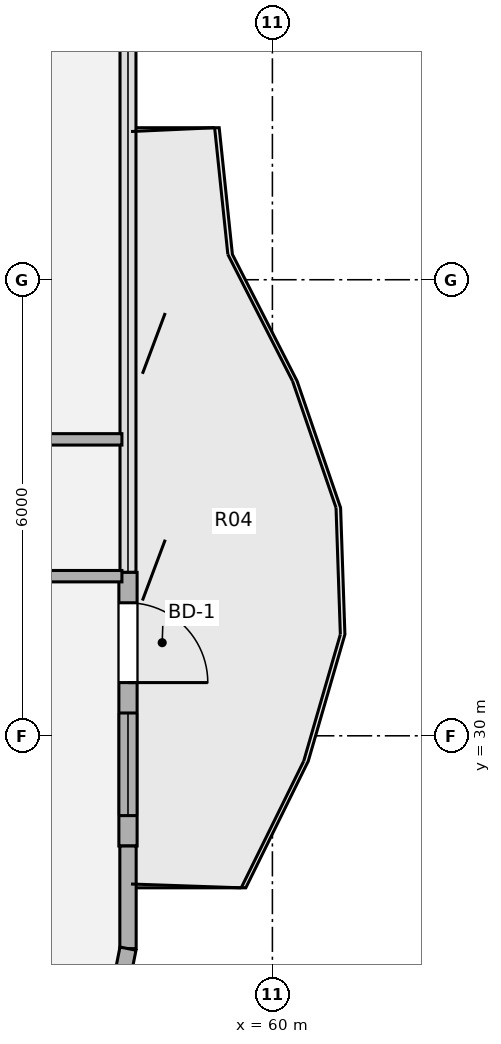
"""IFC4 building model, lengths in metres.
Left out: names, types, materials, properties, quantities, classifications, styles, units other than length and angle.
Written with IfcOpenShell. Run it as: python <this file> out.ifc"""

import sys

from ifc_helpers import new_model, si_unit, direction, frame, frame_2d, origin, origin_2d, place, context, subcontext, project, spatial, rectangle, extrude, source, transform, mapped, element, fill, save


model = new_model("IFC4")
c1 = context("Model", 3, precision=1e-05, world=origin(), true_north=direction((0.0, 1.0)))
c2 = subcontext(c1, "Body", "Model", "MODEL_VIEW")
j1 = project(units=[si_unit("LENGTHUNIT", "METRE"), si_unit("PLANEANGLEUNIT", "RADIAN")], contexts=[c1])
p1 = place(None, origin())
s1 = spatial("IfcSite", under=j1, at=p1, CompositionType="ELEMENT")
p2 = place(p1, origin())
s2 = spatial("IfcBuilding", under=s1, at=p2, CompositionType="ELEMENT")
p3 = place(p2, frame((0.0, 0.0, 112.5)))
s3 = spatial("IfcBuildingStorey", under=s2, at=p3, CompositionType="ELEMENT", Elevation=112.5)
p4 = place(p3, frame((58.1, 32.15, 0.0), z_axis=(0.0, 0.0, 1.0), x_axis=(0.0, -1.0, 0.0)))
e1 = element("IfcWall", 1, at=p4, inside=s3, PredefinedType="SOLIDWALL", context=c2, shape_type="SweptSolid", body=[
    extrude(rectangle(XDim=3.6, YDim=0.24, at=frame_2d((1.8, 0.0))), origin(), (0.0, 0.0, 1.0), 3.53),
])
p5 = place(p4, frame((0.4, 0.0, 0.0)))
e2 = element("IfcOpeningElement", 2, at=p5, cuts=e1, PredefinedType="OPENING", context=c2, shape_type="SweptSolid", body=[
    extrude(rectangle(XDim=1.05, YDim=2.15, at=origin_2d()), frame((0.525, 0.13, 1.075), z_axis=(0.0, -1.0, 0.0), x_axis=(1.0, 0.0, 0.0)), (0.0, 0.0, 1.0), 0.26),
])
p6 = place(p4, frame((1.85, 0.0, 0.85)))
e3 = element("IfcOpeningElement", 3, at=p6, cuts=e1, PredefinedType="OPENING", context=c2, shape_type="SweptSolid", body=[
    extrude(rectangle(XDim=1.35, YDim=1.35, at=origin_2d()), frame((0.675, 0.13, 0.675), z_axis=(0.0, -1.0, 0.0), x_axis=(1.0, 0.0, 0.0)), (0.0, 0.0, 1.0), 0.26),
])
p7 = place(p3, frame((58.1, 28.55, 0.0), z_axis=(0.0, 0.0, 1.0), x_axis=(0.0, -1.0, 0.0)))
e4 = element("IfcWall", 4, at=p7, inside=s3, PredefinedType="SOLIDWALL", context=c2, shape_type="SweptSolid", body=[
    extrude(rectangle(XDim=1.35, YDim=0.215, at=frame_2d((0.675, 0.0))), origin(), (0.0, 0.0, 1.0), 3.53),
])
p8 = place(p3, frame((58.1, 27.2, 0.0), z_axis=(0.0, 0.0, 1.0), x_axis=(-0.195138390419, -0.980775717779, 0.0)))
e5 = element("IfcWall", 5, at=p8, inside=s3, PredefinedType="SOLIDWALL", context=c2, shape_type="SweptSolid", body=[
    extrude(rectangle(XDim=1.249, YDim=0.215, at=frame_2d((0.624, 0.0))), origin(), (0.0, 0.0, 1.0), 3.53),
])
p9 = place(p3, frame((49.6, 32.1, 0.0), z_axis=(0.0, 0.0, 1.0), x_axis=(1.0, 0.0, 0.0)))
e6 = element("IfcWall", 6, at=p9, inside=s3, PredefinedType="PARTITIONING", context=c2, shape_type="SweptSolid", body=[
    extrude(rectangle(XDim=8.42, YDim=0.15, at=frame_2d((4.21, 0.0))), origin(), (0.0, 0.0, 1.0), 2.982),
])
p10 = place(p9, frame((1.375, 0.0, 0.0)))
e7 = element("IfcOpeningElement", 7, at=p10, cuts=e6, PredefinedType="OPENING", context=c2, shape_type="SweptSolid", body=[
    extrude(rectangle(XDim=1.05, YDim=2.1, at=origin_2d()), frame((0.525, 0.085, 1.05), z_axis=(0.0, -1.0, 0.0), x_axis=(1.0, 0.0, 0.0)), (0.0, 0.0, 1.0), 0.17),
])
p11 = place(p3, frame((49.6, 33.9, 0.0), z_axis=(0.0, 0.0, 1.0), x_axis=(1.0, 0.0, 0.0)))
e8 = element("IfcWall", 8, at=p11, inside=s3, PredefinedType="PARTITIONING", context=c2, shape_type="SweptSolid", body=[
    extrude(rectangle(XDim=8.42, YDim=0.15, at=frame_2d((4.21, 0.0))), origin(), (0.0, 0.0, 1.0), 2.982),
])
p12 = place(p11, frame((1.375, 0.0, 0.0)))
e9 = element("IfcOpeningElement", 9, at=p12, cuts=e8, PredefinedType="OPENING", context=c2, shape_type="SweptSolid", body=[
    extrude(rectangle(XDim=1.05, YDim=2.1, at=origin_2d()), frame((0.525, 0.085, 1.05), z_axis=(0.0, -1.0, 0.0), x_axis=(1.0, 0.0, 0.0)), (0.0, 0.0, 1.0), 0.17),
])
m1 = source(origin(), c2, "Body", "SweptSolid", [
    extrude(rectangle(XDim=1.05, YDim=2.15, at=origin_2d()), frame((0.525, 0.025, 1.075), z_axis=(0.0, -1.0, 0.0), x_axis=(1.0, 0.0, 0.0)), (0.0, 0.0, 1.0), 0.05),
])
p13 = place(p5, origin())
e10 = element("IfcDoor", 10, at=p13, inside=s3, OperationType="SINGLE_SWING_RIGHT", PredefinedType="DOOR", context=c2, shape_type="MappedRepresentation", body=[
    mapped(m1, transform((0.0, 0.0, 0.0), x_axis=(1.0, 0.0, 0.0), y_axis=(0.0, 1.0, 0.0), z_axis=(0.0, 0.0, 1.0), scale=1.0)),
])
fill(e2, e10)
m2 = source(origin(), c2, "Body", "SweptSolid", [
    extrude(rectangle(XDim=1.35, YDim=1.35, at=origin_2d()), frame((0.675, 0.03, 0.675), z_axis=(0.0, -1.0, 0.0), x_axis=(1.0, 0.0, 0.0)), (0.0, 0.0, 1.0), 0.06),
])
p14 = place(p6, origin())
e11 = element("IfcWindow", 11, at=p14, inside=s3, PartitioningType="SINGLE_PANEL", PredefinedType="WINDOW", context=c2, shape_type="MappedRepresentation", body=[
    mapped(m2, transform((0.0, 0.0, 0.0), x_axis=(1.0, 0.0, 0.0), y_axis=(0.0, 1.0, 0.0), z_axis=(0.0, 0.0, 1.0), scale=1.0)),
])
fill(e3, e11)
save(model, sys.argv[1])
